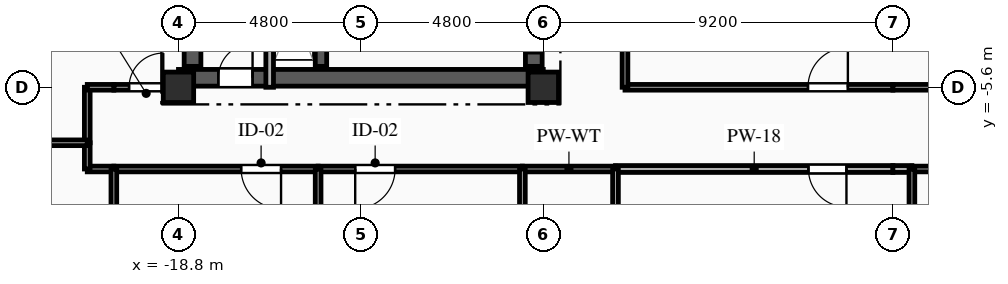
"""IFC4 building model, lengths in metres.
Left out: names, types, materials, properties, quantities, classifications, styles, units other than length and angle.
Written with IfcOpenShell. Run it as: python <this file> out.ifc"""

import sys

from ifc_helpers import new_model, si_unit, direction, frame, frame_2d, origin, origin_2d, place, context, subcontext, project, spatial, rectangle, extrude, element, fill, save


model = new_model("IFC4")
c1 = context("Model", 3, precision=1e-05, world=origin(), true_north=direction((0.0, 1.0)))
c2 = subcontext(c1, "Body", "Model", "MODEL_VIEW")
j1 = project(units=[si_unit("LENGTHUNIT", "METRE"), si_unit("PLANEANGLEUNIT", "RADIAN")], contexts=[c1])
p1 = place(None, origin())
s1 = spatial("IfcSite", under=j1, at=p1, CompositionType="ELEMENT")
p2 = place(p1, origin())
s2 = spatial("IfcBuilding", under=s1, at=p2, CompositionType="ELEMENT")
p3 = place(p2, frame((0.0, 0.0, 255.1)))
s3 = spatial("IfcBuildingStorey", under=s2, at=p3, CompositionType="ELEMENT", Elevation=255.1)
for number, where, z_axis, x_axis in (
    (1, (-18.8, -5.6, 0.0), (0.0, 0.0, 1.0), (1.0, 0.0, 0.0)),
    (2, (-9.2, -5.6, 0.0), (0.0, 0.0, 1.0), (1.0, 0.0, 0.0)),
):
    element("IfcColumn", number, at=place(p3, frame(where, z_axis=z_axis, x_axis=x_axis)), inside=s3, PredefinedType="COLUMN", context=c2, shape_type="SweptSolid", body=[
        extrude(rectangle(XDim=0.8, YDim=0.8, at=origin_2d()), origin(), (0.0, 0.0, 1.0), 3.35),
    ])
p4 = place(p3, frame((-18.8, -5.35, 0.0), z_axis=(0.0, 0.0, 1.0), x_axis=(1.0, 0.0, 0.0)))
e3 = element("IfcWall", 3, at=p4, inside=s3, PredefinedType="SHEAR", context=c2, shape_type="SweptSolid", body=[
    extrude(rectangle(XDim=9.6, YDim=0.44, at=frame_2d((4.8, 0.0))), origin(), (0.0, 0.0, 1.0), 3.04),
])
p5 = place(p4, frame((1.05, 0.0, 0.0)))
e4 = element("IfcOpeningElement", 4, at=p5, cuts=e3, PredefinedType="OPENING", context=c2, shape_type="SweptSolid", body=[
    extrude(rectangle(XDim=0.9, YDim=2.1, at=frame_2d((0.45, 1.05))), frame((0.0, 0.23, 0.0), z_axis=(0.0, -1.0, 0.0), x_axis=(1.0, 0.0, 0.0)), (0.0, 0.0, 1.0), 0.46),
])
p6 = place(p3, frame((-18.43, -5.05, 0.0), z_axis=(0.0, 0.0, 1.0), x_axis=(0.0, 1.0, 0.0)))
e5 = element("IfcWall", 5, at=p6, inside=s3, PredefinedType="SHEAR", context=c2, shape_type="SweptSolid", body=[
    extrude(rectangle(XDim=10.1, YDim=0.44, at=frame_2d((5.05, 0.0))), origin(), (0.0, 0.0, 1.0), 3.04),
])
p7 = place(p3, frame((-9.45, -5.05, 0.0), z_axis=(0.0, 0.0, 1.0), x_axis=(0.0, 1.0, 0.0)))
e6 = element("IfcWall", 6, at=p7, inside=s3, PredefinedType="SHEAR", context=c2, shape_type="SweptSolid", body=[
    extrude(rectangle(XDim=10.1, YDim=0.44, at=frame_2d((5.05, 0.0))), origin(), (0.0, 0.0, 1.0), 3.04),
])
p8 = place(p7, frame((7.15, 0.0, 0.0)))
e7 = element("IfcOpeningElement", 7, at=p8, cuts=e6, PredefinedType="OPENING", context=c2, shape_type="SweptSolid", body=[
    extrude(rectangle(XDim=0.9, YDim=2.1, at=frame_2d((0.45, 1.05))), frame((0.0, 0.23, 0.0), z_axis=(0.0, -1.0, 0.0), x_axis=(1.0, 0.0, 0.0)), (0.0, 0.0, 1.0), 0.46),
])
p9 = place(p7, frame((2.4, 0.0, 0.0)))
e8 = element("IfcOpeningElement", 8, at=p9, cuts=e6, PredefinedType="OPENING", context=c2, shape_type="SweptSolid", body=[
    extrude(rectangle(XDim=1.2, YDim=2.15, at=frame_2d((0.6, 1.075))), frame((0.0, 0.23, 0.0), z_axis=(0.0, -1.0, 0.0), x_axis=(1.0, 0.0, 0.0)), (0.0, 0.0, 1.0), 0.46),
])
p10 = place(p7, frame((0.35, 0.0, 0.0)))
e9 = element("IfcOpeningElement", 9, at=p10, cuts=e6, PredefinedType="OPENING", context=c2, shape_type="SweptSolid", body=[
    extrude(rectangle(XDim=0.9, YDim=2.1, at=frame_2d((0.45, 1.05))), frame((0.0, 0.23, 0.0), z_axis=(0.0, -1.0, 0.0), x_axis=(1.0, 0.0, 0.0)), (0.0, 0.0, 1.0), 0.46),
])
p11 = place(p7, frame((5.0, 0.0, 0.0)))
e10 = element("IfcOpeningElement", 10, at=p11, cuts=e6, PredefinedType="OPENING", context=c2, shape_type="SweptSolid", body=[
    extrude(rectangle(XDim=0.9, YDim=2.1, at=frame_2d((0.45, 1.05))), frame((0.0, 0.23, 0.0), z_axis=(0.0, -1.0, 0.0), x_axis=(1.0, 0.0, 0.0)), (0.0, 0.0, 1.0), 0.46),
])
p12 = place(p3, frame((-15.05, -5.05, 0.0), z_axis=(0.0, 0.0, 1.0), x_axis=(0.0, 1.0, 0.0)))
e11 = element("IfcWall", 11, at=p12, inside=s3, PredefinedType="SHEAR", context=c2, shape_type="SweptSolid", body=[
    extrude(rectangle(XDim=10.1, YDim=0.3, at=frame_2d((5.05, 0.0))), origin(), (0.0, 0.0, 1.0), 3.04),
])
p13 = place(p3, frame((-16.4, -5.6, 0.0), z_axis=(0.0, 0.0, 1.0), x_axis=(0.0, 1.0, 0.0)))
e12 = element("IfcWall", 12, at=p13, inside=s3, PredefinedType="PARTITIONING", context=c2, shape_type="SweptSolid", body=[
    extrude(rectangle(XDim=3.49, YDim=0.2, at=frame_2d((1.745, 0.0))), origin(), (0.0, 0.0, 1.0), 3.04),
])
p14 = place(p3, frame((-20.5, -7.75, 0.0), z_axis=(0.0, 0.0, 1.0), x_axis=(-1.0, 0.0, 0.0)))
e13 = element("IfcWall", 13, at=p14, inside=s3, PredefinedType="PARTITIONING", context=c2, shape_type="SweptSolid", body=[
    extrude(rectangle(XDim=0.7, YDim=0.15, at=frame_2d((0.35, 0.0))), origin(), (0.0, 0.0, 1.0), 3.04),
])
p15 = place(p3, frame((-21.2, -7.75, 0.0), z_axis=(0.0, 0.0, 1.0), x_axis=(0.0, 1.0, 0.0)))
e14 = element("IfcWall", 14, at=p15, inside=s3, PredefinedType="PARTITIONING", context=c2, shape_type="SweptSolid", body=[
    extrude(rectangle(XDim=0.69, YDim=0.15, at=frame_2d((0.345, 0.0))), origin(), (0.0, 0.0, 1.0), 2.695),
])
p16 = place(p3, frame((-20.5, -5.6, 0.0), z_axis=(0.0, 0.0, 1.0), x_axis=(1.0, 0.0, 0.0)))
e15 = element("IfcWall", 15, at=p16, inside=s3, PredefinedType="PARTITIONING", context=c2, shape_type="SweptSolid", body=[
    extrude(rectangle(XDim=1.7, YDim=0.15, at=frame_2d((0.85, 0.0))), origin(), (0.0, 0.0, 1.0), 3.04),
])
p17 = place(p16, frame((0.4, 0.0, 0.0)))
e16 = element("IfcOpeningElement", 16, at=p17, cuts=e15, PredefinedType="OPENING", context=c2, shape_type="SweptSolid", body=[
    extrude(rectangle(XDim=0.9, YDim=2.1, at=frame_2d((0.45, 1.05))), frame((0.0, 0.085, 0.0), z_axis=(0.0, -1.0, 0.0), x_axis=(1.0, 0.0, 0.0)), (0.0, 0.0, 1.0), 0.17),
])
p18 = place(p3, frame((-21.2, -7.06, 0.0), z_axis=(0.0, 0.0, 1.0), x_axis=(0.0, 1.0, 0.0)))
e17 = element("IfcWall", 17, at=p18, inside=s3, PredefinedType="PARTITIONING", context=c2, shape_type="SweptSolid", body=[
    extrude(rectangle(XDim=1.46, YDim=0.15, at=frame_2d((0.73, 0.0))), origin(), (0.0, 0.0, 1.0), 2.695),
])
p19 = place(p3, frame((-21.2, -5.6, 0.0), z_axis=(0.0, 0.0, 1.0), x_axis=(1.0, 0.0, 0.0)))
e18 = element("IfcWall", 18, at=p19, inside=s3, PredefinedType="PARTITIONING", context=c2, shape_type="SweptSolid", body=[
    extrude(rectangle(XDim=0.7, YDim=0.15, at=frame_2d((0.35, 0.0))), origin(), (0.0, 0.0, 1.0), 3.04),
])
p20 = place(p3, frame((-15.125, -7.75, 0.0), z_axis=(0.0, 0.0, 1.0), x_axis=(-1.0, 0.0, 0.0)))
e19 = element("IfcWall", 19, at=p20, inside=s3, PredefinedType="PARTITIONING", context=c2, shape_type="SweptSolid", body=[
    extrude(rectangle(XDim=5.375, YDim=0.15, at=frame_2d((2.688, 0.0))), origin(), (0.0, 0.0, 1.0), 3.04),
])
p21 = place(p20, frame((0.976, 0.0, 0.0)))
e20 = element("IfcOpeningElement", 20, at=p21, cuts=e19, PredefinedType="OPENING", context=c2, shape_type="SweptSolid", body=[
    extrude(rectangle(XDim=1.05, YDim=2.15, at=frame_2d((0.525, 1.075))), frame((0.0, 0.085, 0.0), z_axis=(0.0, -1.0, 0.0), x_axis=(1.0, 0.0, 0.0)), (0.0, 0.0, 1.0), 0.17),
])
p22 = place(p3, frame((-9.75, -7.75, 0.0), z_axis=(0.0, 0.0, 1.0), x_axis=(-1.0, 0.0, 0.0)))
e21 = element("IfcWall", 21, at=p22, inside=s3, PredefinedType="PARTITIONING", context=c2, shape_type="SweptSolid", body=[
    extrude(rectangle(XDim=5.375, YDim=0.15, at=frame_2d((2.688, 0.0))), origin(), (0.0, 0.0, 1.0), 3.04),
])
p23 = place(p22, frame((3.349, 0.0, 0.0)))
e22 = element("IfcOpeningElement", 22, at=p23, cuts=e21, PredefinedType="OPENING", context=c2, shape_type="SweptSolid", body=[
    extrude(rectangle(XDim=1.05, YDim=2.15, at=frame_2d((0.525, 1.075))), frame((0.0, 0.085, 0.0), z_axis=(0.0, -1.0, 0.0), x_axis=(1.0, 0.0, 0.0)), (0.0, 0.0, 1.0), 0.17),
])
p24 = place(p3, frame((0.0, -7.75, 0.0), z_axis=(0.0, 0.0, 1.0), x_axis=(-1.0, 0.0, 0.0)))
e23 = element("IfcWall", 23, at=p24, inside=s3, PredefinedType="PARTITIONING", context=c2, shape_type="SweptSolid", body=[
    extrude(rectangle(XDim=7.3, YDim=0.18, at=frame_2d((3.65, 0.0))), origin(), (0.0, 0.0, 1.0), 3.04),
])
p25 = place(p24, frame((1.222, 0.0, 0.0)))
e24 = element("IfcOpeningElement", 24, at=p25, cuts=e23, PredefinedType="OPENING", context=c2, shape_type="SweptSolid", body=[
    extrude(rectangle(XDim=1.0, YDim=2.15, at=frame_2d((0.5, 1.075))), frame((0.0, 0.1, 0.0), z_axis=(0.0, -1.0, 0.0), x_axis=(1.0, 0.0, 0.0)), (0.0, 0.0, 1.0), 0.2),
])
p26 = place(p3, frame((-7.3, -7.75, 0.0), z_axis=(0.0, 0.0, 1.0), x_axis=(-1.0, 0.0, 0.0)))
e25 = element("IfcWall", 25, at=p26, inside=s3, PredefinedType="PLUMBINGWALL", context=c2, shape_type="SweptSolid", body=[
    extrude(rectangle(XDim=2.45, YDim=0.15, at=frame_2d((1.225, 0.0))), origin(), (0.0, 0.0, 1.0), 3.04),
])
p27 = place(p3, frame((-7.05, -5.6, 0.0), z_axis=(0.0, 0.0, 1.0), x_axis=(1.0, 0.0, 0.0)))
e26 = element("IfcWall", 26, at=p27, inside=s3, PredefinedType="PARTITIONING", context=c2, shape_type="SweptSolid", body=[
    extrude(rectangle(XDim=7.05, YDim=0.15, at=frame_2d((3.525, 0.0))), origin(), (0.0, 0.0, 1.0), 2.525),
])
p28 = place(p27, frame((4.815, 0.0, 0.0)))
e27 = element("IfcOpeningElement", 27, at=p28, cuts=e26, PredefinedType="OPENING", context=c2, shape_type="SweptSolid", body=[
    extrude(rectangle(XDim=1.05, YDim=2.15, at=frame_2d((0.525, 1.075))), frame((0.0, 0.085, 0.0), z_axis=(0.0, -1.0, 0.0), x_axis=(1.0, 0.0, 0.0)), (0.0, 0.0, 1.0), 0.17),
])
p29 = place(p3, frame((0.5, -7.75, 0.0), z_axis=(0.0, 0.0, 1.0), x_axis=(-1.0, 0.0, 0.0)))
e28 = element("IfcWall", 28, at=p29, inside=s3, PredefinedType="PARTITIONING", context=c2, shape_type="SweptSolid", body=[
    extrude(rectangle(XDim=0.5, YDim=0.18, at=frame_2d((0.25, 0.0))), origin(), (0.0, 0.0, 1.0), 3.04),
])
p30 = place(p3, frame((2.95, -7.75, 0.0), z_axis=(0.0, 0.0, 1.0), x_axis=(-1.0, 0.0, 0.0)))
e29 = element("IfcWall", 29, at=p30, inside=s3, PredefinedType="PLUMBINGWALL", context=c2, shape_type="SweptSolid", body=[
    extrude(rectangle(XDim=2.45, YDim=0.15, at=frame_2d((1.225, 0.0))), origin(), (0.0, 0.0, 1.0), 3.04),
])
p31 = place(p3, frame((0.0, -5.6, 0.0), z_axis=(0.0, 0.0, 1.0), x_axis=(1.0, 0.0, 0.0)))
e30 = element("IfcWall", 30, at=p31, inside=s3, PredefinedType="PARTITIONING", context=c2, shape_type="SweptSolid", body=[
    extrude(rectangle(XDim=7.05, YDim=0.15, at=frame_2d((3.525, 0.0))), origin(), (0.0, 0.0, 1.0), 2.525),
])
p32 = place(p3, frame((-7.05, 1.45, 0.0), z_axis=(0.0, 0.0, 1.0), x_axis=(0.0, -1.0, 0.0)))
e31 = element("IfcWall", 31, at=p32, inside=s3, PredefinedType="PARTITIONING", context=c2, shape_type="SweptSolid", body=[
    extrude(rectangle(XDim=7.05, YDim=0.15, at=frame_2d((3.525, 0.0))), origin(), (0.0, 0.0, 1.0), 3.04),
])
p33 = place(p3, frame((-24.0, -7.06, 0.0), z_axis=(0.0, 0.0, 1.0), x_axis=(1.0, 0.0, 0.0)))
e32 = element("IfcWall", 32, at=p33, inside=s3, PredefinedType="PARTITIONING", context=c2, shape_type="SweptSolid", body=[
    extrude(rectangle(XDim=2.8, YDim=0.15, at=frame_2d((1.4, 0.0))), origin(), (0.0, 0.0, 1.0), 3.04),
])
p34 = place(p3, frame((-20.5, -7.75, 0.0), z_axis=(0.0, 0.0, 1.0), x_axis=(0.0, -1.0, 0.0)))
e33 = element("IfcWall", 33, at=p34, inside=s3, PredefinedType="PARTITIONING", context=c2, shape_type="SweptSolid", body=[
    extrude(rectangle(XDim=10.65, YDim=0.15, at=frame_2d((5.325, 0.0))), origin(), (0.0, 0.0, 1.0), 2.665),
])
p35 = place(p34, frame((2.69, 0.0, 0.0)))
e34 = element("IfcOpeningElement", 34, at=p35, cuts=e33, PredefinedType="OPENING", context=c2, shape_type="SweptSolid", body=[
    extrude(rectangle(XDim=1.05, YDim=2.15, at=frame_2d((0.525, 1.075))), frame((0.0, 0.085, 0.0), z_axis=(0.0, -1.0, 0.0), x_axis=(1.0, 0.0, 0.0)), (0.0, 0.0, 1.0), 0.17),
])
p36 = place(p3, frame((-15.125, -7.75, 0.0), z_axis=(0.0, 0.0, 1.0), x_axis=(0.0, -1.0, 0.0)))
e35 = element("IfcWall", 35, at=p36, inside=s3, PredefinedType="PARTITIONING", context=c2, shape_type="SweptSolid", body=[
    extrude(rectangle(XDim=10.65, YDim=0.15, at=frame_2d((5.325, 0.0))), origin(), (0.0, 0.0, 1.0), 3.04),
])
for number, where, z_axis, x_axis in (
    (36, (-9.75, -7.75, 0.0), (0.0, 0.0, 1.0), (0.0, -1.0, 0.0)),
    (37, (-7.3, -9.9, 0.0), (0.0, 0.0, 1.0), (0.0, 1.0, 0.0)),
    (38, (0.5, -7.75, 0.0), (0.0, 0.0, 1.0), (0.0, -1.0, 0.0)),
):
    element("IfcWall", number, at=place(p3, frame(where, z_axis=z_axis, x_axis=x_axis)), inside=s3, PredefinedType="PLUMBINGWALL", context=c2, shape_type="SweptSolid", body=[
        extrude(rectangle(XDim=2.15, YDim=0.15, at=frame_2d((1.075, 0.0))), origin(), (0.0, 0.0, 1.0), 3.04),
    ])
p37 = place(p5, origin())
e39 = element("IfcDoor", 39, at=p37, inside=s3, OperationType="SINGLE_SWING_RIGHT", PredefinedType="DOOR", context=c2, shape_type="SweptSolid", body=[
    extrude(rectangle(XDim=0.9, YDim=2.1, at=frame_2d((0.45, 1.05))), frame((0.0, 0.025, 0.0), z_axis=(0.0, -1.0, 0.0), x_axis=(1.0, 0.0, 0.0)), (0.0, 0.0, 1.0), 0.05),
])
fill(e4, e39)
p38 = place(p10, origin())
e40 = element("IfcDoor", 40, at=p38, inside=s3, OperationType="SINGLE_SWING_RIGHT", PredefinedType="DOOR", context=c2, shape_type="SweptSolid", body=[
    extrude(rectangle(XDim=0.9, YDim=2.1, at=frame_2d((0.45, 1.05))), frame((0.0, 0.025, 0.0), z_axis=(0.0, -1.0, 0.0), x_axis=(1.0, 0.0, 0.0)), (0.0, 0.0, 1.0), 0.05),
])
fill(e9, e40)
p39 = place(p17, origin())
e41 = element("IfcDoor", 41, at=p39, inside=s3, OperationType="SINGLE_SWING_RIGHT", PredefinedType="DOOR", context=c2, shape_type="SweptSolid", body=[
    extrude(rectangle(XDim=0.9, YDim=2.1, at=frame_2d((0.45, 1.05))), frame((0.0, 0.025, 0.0), z_axis=(0.0, -1.0, 0.0), x_axis=(1.0, 0.0, 0.0)), (0.0, 0.0, 1.0), 0.05),
])
fill(e16, e41)
p40 = place(p21, origin())
e42 = element("IfcDoor", 42, at=p40, inside=s3, OperationType="SINGLE_SWING_LEFT", PredefinedType="DOOR", context=c2, shape_type="SweptSolid", body=[
    extrude(rectangle(XDim=1.05, YDim=2.15, at=frame_2d((0.525, 1.075))), frame((0.0, 0.025, 0.0), z_axis=(0.0, -1.0, 0.0), x_axis=(1.0, 0.0, 0.0)), (0.0, 0.0, 1.0), 0.05),
])
fill(e20, e42)
p41 = place(p23, origin())
e43 = element("IfcDoor", 43, at=p41, inside=s3, OperationType="SINGLE_SWING_RIGHT", PredefinedType="DOOR", context=c2, shape_type="SweptSolid", body=[
    extrude(rectangle(XDim=1.05, YDim=2.15, at=frame_2d((0.525, 1.075))), frame((0.0, 0.025, 0.0), z_axis=(0.0, -1.0, 0.0), x_axis=(1.0, 0.0, 0.0)), (0.0, 0.0, 1.0), 0.05),
])
fill(e22, e43)
p42 = place(p25, origin())
e44 = element("IfcDoor", 44, at=p42, inside=s3, OperationType="SINGLE_SWING_LEFT", PredefinedType="DOOR", context=c2, shape_type="SweptSolid", body=[
    extrude(rectangle(XDim=1.0, YDim=2.15, at=frame_2d((0.5, 1.075))), frame((0.0, 0.025, 0.0), z_axis=(0.0, -1.0, 0.0), x_axis=(1.0, 0.0, 0.0)), (0.0, 0.0, 1.0), 0.05),
])
fill(e24, e44)
p43 = place(p28, origin())
e45 = element("IfcDoor", 45, at=p43, inside=s3, OperationType="SINGLE_SWING_RIGHT", PredefinedType="DOOR", context=c2, shape_type="SweptSolid", body=[
    extrude(rectangle(XDim=1.05, YDim=2.15, at=frame_2d((0.525, 1.075))), frame((0.0, 0.025, 0.0), z_axis=(0.0, -1.0, 0.0), x_axis=(1.0, 0.0, 0.0)), (0.0, 0.0, 1.0), 0.05),
])
fill(e27, e45)
save(model, sys.argv[1])
